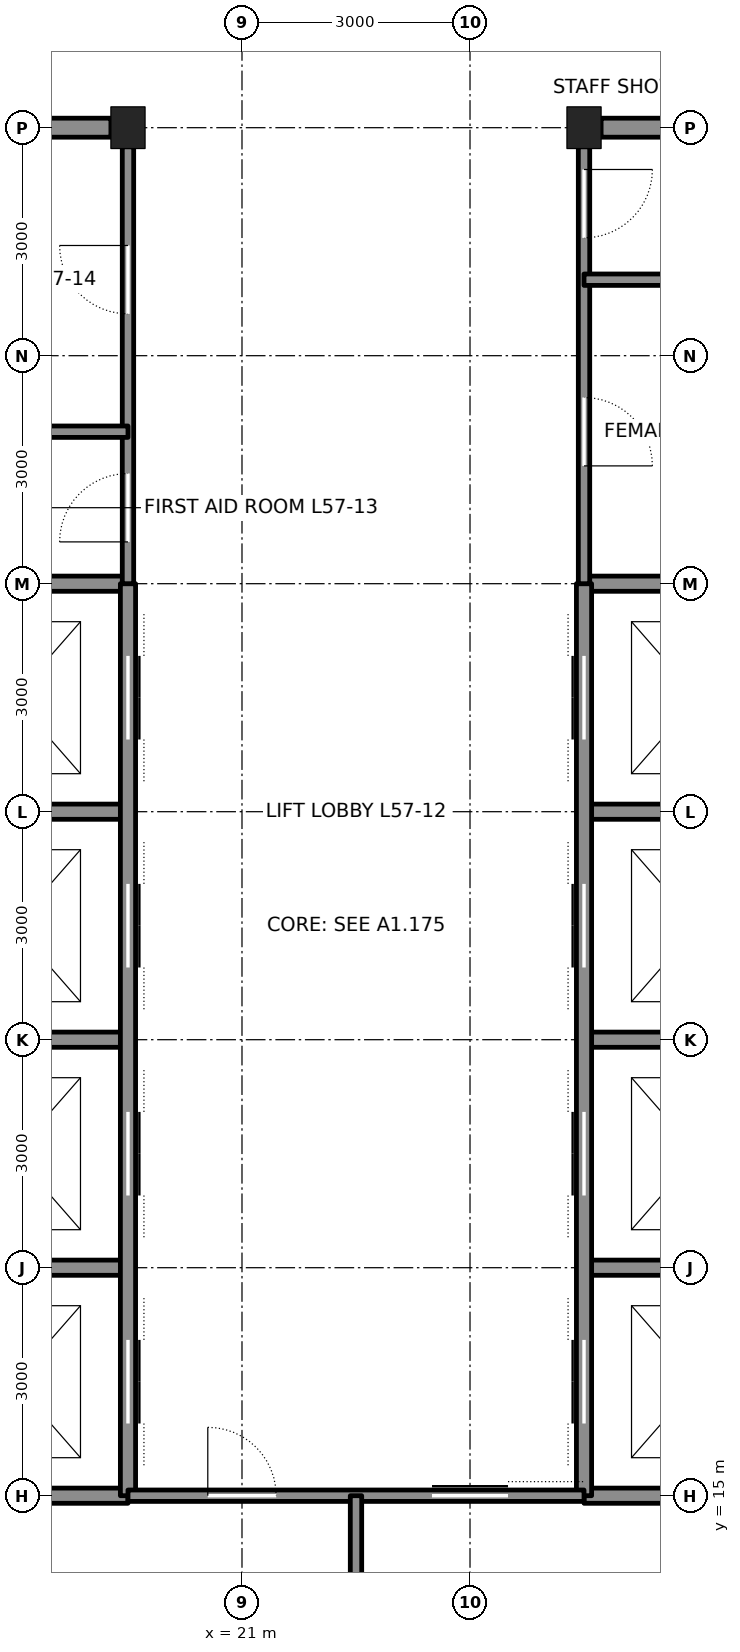
"""IFC4 building model, lengths in metres.
Left out: names, types, materials, properties, quantities, classifications, styles, units other than length and angle.
Written with IfcOpenShell. Run it as: python <this file> out.ifc"""

import sys

from ifc_helpers import new_model, si_unit, direction, frame, frame_2d, origin, origin_2d, place, context, subcontext, project, spatial, rectangle, i_section, extrude, element, fill, save


model = new_model("IFC4")
c1 = context("Model", 3, precision=1e-05, world=origin(), true_north=direction((0.0, 1.0)))
c2 = subcontext(c1, "Body", "Model", "MODEL_VIEW")
j1 = project(units=[si_unit("LENGTHUNIT", "METRE"), si_unit("PLANEANGLEUNIT", "RADIAN")], contexts=[c1])
p1 = place(None, origin())
s1 = spatial("IfcSite", under=j1, at=p1, CompositionType="ELEMENT")
p2 = place(p1, origin())
s2 = spatial("IfcBuilding", under=s1, at=p2, CompositionType="ELEMENT")
p3 = place(p2, frame((0.0, 0.0, 257.7)))
s3 = spatial("IfcBuildingStorey", under=s2, at=p3, CompositionType="ELEMENT", Elevation=257.7)
for number, where, z_axis, x_axis in (
    (1, (19.5, 33.0, 0.0), (0.0, 0.0, 1.0), (1.0, 0.0, 0.0)),
    (2, (25.5, 33.0, 0.0), (0.0, 0.0, 1.0), (1.0, 0.0, 0.0)),
):
    element("IfcColumn", number, at=place(p3, frame(where, z_axis=z_axis, x_axis=x_axis)), inside=s3, PredefinedType="COLUMN", context=c2, shape_type="SweptSolid", body=[
        extrude(i_section(OverallWidth=0.449, OverallDepth=0.549, WebThickness=0.072, FlangeThickness=0.115, at=origin_2d()), origin(), (0.0, 0.0, 1.0), 4.5),
    ])
for number, where, z_axis, x_axis in (
    (3, (12.0, 15.0, 0.0), (0.0, 0.0, 1.0), (1.0, 0.0, 0.0)),
    (4, (25.5, 15.0, 0.0), (0.0, 0.0, 1.0), (1.0, 0.0, 0.0)),
):
    element("IfcWall", number, at=place(p3, frame(where, z_axis=z_axis, x_axis=x_axis)), inside=s3, PredefinedType="SOLIDWALL", context=c2, shape_type="SweptSolid", body=[
        extrude(rectangle(XDim=7.5, YDim=0.2, at=frame_2d((3.75, 0.0))), origin(), (0.0, 0.0, 1.0), 4.34),
    ])
for number, where, z_axis, x_axis in (
    (5, (16.725, 24.0, 0.0), (0.0, 0.0, 1.0), (1.0, 0.0, 0.0)),
    (6, (25.5, 24.0, 0.0), (0.0, 0.0, 1.0), (1.0, 0.0, 0.0)),
):
    element("IfcWall", number, at=place(p3, frame(where, z_axis=z_axis, x_axis=x_axis)), inside=s3, PredefinedType="SOLIDWALL", context=c2, shape_type="SweptSolid", body=[
        extrude(rectangle(XDim=2.775, YDim=0.2, at=frame_2d((1.388, 0.0))), origin(), (0.0, 0.0, 1.0), 3.39),
    ])
p4 = place(p3, frame((12.0, 27.0, 0.0), z_axis=(0.0, 0.0, 1.0), x_axis=(1.0, 0.0, 0.0)))
e7 = element("IfcWall", 7, at=p4, inside=s3, PredefinedType="SOLIDWALL", context=c2, shape_type="SweptSolid", body=[
    extrude(rectangle(XDim=7.5, YDim=0.2, at=frame_2d((3.75, 0.0))), origin(), (0.0, 0.0, 1.0), 4.34),
])
p5 = place(p4, frame((1.65, 0.0, 0.0)))
e8 = element("IfcOpeningElement", 8, at=p5, cuts=e7, PredefinedType="OPENING", context=c2, shape_type="SweptSolid", body=[
    extrude(rectangle(XDim=1.2, YDim=2.1, at=frame_2d((0.6, 1.05))), frame((0.0, 0.11, 0.0), z_axis=(0.0, -1.0, 0.0), x_axis=(1.0, 0.0, 0.0)), (0.0, 0.0, 1.0), 0.22),
])
p6 = place(p3, frame((25.5, 27.0, 0.0), z_axis=(0.0, 0.0, 1.0), x_axis=(1.0, 0.0, 0.0)))
e9 = element("IfcWall", 9, at=p6, inside=s3, PredefinedType="SOLIDWALL", context=c2, shape_type="SweptSolid", body=[
    extrude(rectangle(XDim=3.0, YDim=0.2, at=frame_2d((1.5, 0.0))), origin(), (0.0, 0.0, 1.0), 4.34),
])
for number, where, z_axis, x_axis in (
    (10, (16.725, 33.0, 0.0), (0.0, 0.0, 1.0), (1.0, 0.0, 0.0)),
    (11, (25.725, 33.0, 0.0), (0.0, 0.0, 1.0), (1.0, 0.0, 0.0)),
):
    element("IfcWall", number, at=place(p3, frame(where, z_axis=z_axis, x_axis=x_axis)), inside=s3, PredefinedType="SOLIDWALL", context=c2, shape_type="SweptSolid", body=[
        extrude(rectangle(XDim=2.55, YDim=0.25, at=frame_2d((1.275, 0.0))), origin(), (0.0, 0.0, 1.0), 3.481),
    ])
p7 = place(p3, frame((16.5, 18.0, 0.0), z_axis=(0.0, 0.0, 1.0), x_axis=(1.0, 0.0, 0.0)))
e12 = element("IfcWall", 12, at=p7, inside=s3, PredefinedType="SOLIDWALL", context=c2, shape_type="SweptSolid", body=[
    extrude(rectangle(XDim=3.0, YDim=0.2, at=frame_2d((1.5, 0.0))), origin(), (0.0, 0.0, 1.0), 4.34),
])
p8 = place(p3, frame((25.5, 18.0, 0.0), z_axis=(0.0, 0.0, 1.0), x_axis=(1.0, 0.0, 0.0)))
e13 = element("IfcWall", 13, at=p8, inside=s3, PredefinedType="SOLIDWALL", context=c2, shape_type="SweptSolid", body=[
    extrude(rectangle(XDim=7.5, YDim=0.2, at=frame_2d((3.75, 0.0))), origin(), (0.0, 0.0, 1.0), 4.34),
])
p9 = place(p8, frame((4.65, 0.0, 0.0)))
e14 = element("IfcOpeningElement", 14, at=p9, cuts=e13, PredefinedType="OPENING", context=c2, shape_type="SweptSolid", body=[
    extrude(rectangle(XDim=1.2, YDim=2.1, at=frame_2d((0.6, 1.05))), frame((0.0, 0.11, 0.0), z_axis=(0.0, -1.0, 0.0), x_axis=(1.0, 0.0, 0.0)), (0.0, 0.0, 1.0), 0.22),
])
for number, where, z_axis, x_axis in (
    (15, (16.725, 21.0, 0.0), (0.0, 0.0, 1.0), (1.0, 0.0, 0.0)),
    (16, (25.5, 21.0, 0.0), (0.0, 0.0, 1.0), (1.0, 0.0, 0.0)),
):
    element("IfcWall", number, at=place(p3, frame(where, z_axis=z_axis, x_axis=x_axis)), inside=s3, PredefinedType="SOLIDWALL", context=c2, shape_type="SweptSolid", body=[
        extrude(rectangle(XDim=2.775, YDim=0.2, at=frame_2d((1.388, 0.0))), origin(), (0.0, 0.0, 1.0), 3.39),
    ])
p10 = place(p3, frame((19.5, 15.0, 0.0), z_axis=(0.0, 0.0, 1.0), x_axis=(0.0, 1.0, 0.0)))
e17 = element("IfcWall", 17, at=p10, inside=s3, PredefinedType="SOLIDWALL", context=c2, shape_type="SweptSolid", body=[
    extrude(rectangle(XDim=12.0, YDim=0.2, at=frame_2d((6.0, 0.0))), origin(), (0.0, 0.0, 1.0), 3.365),
])
p11 = place(p10, frame((0.95, 0.0, 0.0)))
e18 = element("IfcOpeningElement", 18, at=p11, cuts=e17, PredefinedType="OPENING", context=c2, shape_type="SweptSolid", body=[
    extrude(rectangle(XDim=1.1, YDim=2.1, at=frame_2d((0.55, 1.05))), frame((0.0, 0.11, 0.0), z_axis=(0.0, -1.0, 0.0), x_axis=(1.0, 0.0, 0.0)), (0.0, 0.0, 1.0), 0.22),
])
p12 = place(p10, frame((3.95, 0.0, 0.0)))
e19 = element("IfcOpeningElement", 19, at=p12, cuts=e17, PredefinedType="OPENING", context=c2, shape_type="SweptSolid", body=[
    extrude(rectangle(XDim=1.1, YDim=2.1, at=frame_2d((0.55, 1.05))), frame((0.0, 0.11, 0.0), z_axis=(0.0, -1.0, 0.0), x_axis=(1.0, 0.0, 0.0)), (0.0, 0.0, 1.0), 0.22),
])
p13 = place(p10, frame((6.95, 0.0, 0.0)))
e20 = element("IfcOpeningElement", 20, at=p13, cuts=e17, PredefinedType="OPENING", context=c2, shape_type="SweptSolid", body=[
    extrude(rectangle(XDim=1.1, YDim=2.1, at=frame_2d((0.55, 1.05))), frame((0.0, 0.11, 0.0), z_axis=(0.0, -1.0, 0.0), x_axis=(1.0, 0.0, 0.0)), (0.0, 0.0, 1.0), 0.22),
])
p14 = place(p10, frame((9.95, 0.0, 0.0)))
e21 = element("IfcOpeningElement", 21, at=p14, cuts=e17, PredefinedType="OPENING", context=c2, shape_type="SweptSolid", body=[
    extrude(rectangle(XDim=1.1, YDim=2.1, at=frame_2d((0.55, 1.05))), frame((0.0, 0.11, 0.0), z_axis=(0.0, -1.0, 0.0), x_axis=(1.0, 0.0, 0.0)), (0.0, 0.0, 1.0), 0.22),
])
p15 = place(p3, frame((19.5, 27.0, 0.0), z_axis=(0.0, 0.0, 1.0), x_axis=(0.0, 1.0, 0.0)))
e22 = element("IfcWall", 22, at=p15, inside=s3, PredefinedType="PARTITIONING", context=c2, shape_type="SweptSolid", body=[
    extrude(rectangle(XDim=5.75, YDim=0.15, at=frame_2d((2.875, 0.0))), origin(), (0.0, 0.0, 1.0), 3.365),
])
p16 = place(p15, frame((0.55, 0.0, 0.0)))
e23 = element("IfcOpeningElement", 23, at=p16, cuts=e22, PredefinedType="OPENING", context=c2, shape_type="SweptSolid", body=[
    extrude(rectangle(XDim=0.9, YDim=2.1, at=frame_2d((0.45, 1.05))), frame((0.0, 0.085, 0.0), z_axis=(0.0, -1.0, 0.0), x_axis=(1.0, 0.0, 0.0)), (0.0, 0.0, 1.0), 0.17),
])
p17 = place(p15, frame((3.55, 0.0, 0.0)))
e24 = element("IfcOpeningElement", 24, at=p17, cuts=e22, PredefinedType="OPENING", context=c2, shape_type="SweptSolid", body=[
    extrude(rectangle(XDim=0.9, YDim=2.1, at=frame_2d((0.45, 1.05))), frame((0.0, 0.085, 0.0), z_axis=(0.0, -1.0, 0.0), x_axis=(1.0, 0.0, 0.0)), (0.0, 0.0, 1.0), 0.17),
])
p18 = place(p3, frame((25.5, 15.0, 0.0), z_axis=(0.0, 0.0, 1.0), x_axis=(0.0, 1.0, 0.0)))
e25 = element("IfcWall", 25, at=p18, inside=s3, PredefinedType="SOLIDWALL", context=c2, shape_type="SweptSolid", body=[
    extrude(rectangle(XDim=12.0, YDim=0.2, at=frame_2d((6.0, 0.0))), origin(), (0.0, 0.0, 1.0), 3.365),
])
p19 = place(p18, frame((0.95, 0.0, 0.0)))
e26 = element("IfcOpeningElement", 26, at=p19, cuts=e25, PredefinedType="OPENING", context=c2, shape_type="SweptSolid", body=[
    extrude(rectangle(XDim=1.1, YDim=2.1, at=frame_2d((0.55, 1.05))), frame((0.0, 0.11, 0.0), z_axis=(0.0, -1.0, 0.0), x_axis=(1.0, 0.0, 0.0)), (0.0, 0.0, 1.0), 0.22),
])
p20 = place(p18, frame((3.95, 0.0, 0.0)))
e27 = element("IfcOpeningElement", 27, at=p20, cuts=e25, PredefinedType="OPENING", context=c2, shape_type="SweptSolid", body=[
    extrude(rectangle(XDim=1.1, YDim=2.1, at=frame_2d((0.55, 1.05))), frame((0.0, 0.11, 0.0), z_axis=(0.0, -1.0, 0.0), x_axis=(1.0, 0.0, 0.0)), (0.0, 0.0, 1.0), 0.22),
])
p21 = place(p18, frame((6.95, 0.0, 0.0)))
e28 = element("IfcOpeningElement", 28, at=p21, cuts=e25, PredefinedType="OPENING", context=c2, shape_type="SweptSolid", body=[
    extrude(rectangle(XDim=1.1, YDim=2.1, at=frame_2d((0.55, 1.05))), frame((0.0, 0.11, 0.0), z_axis=(0.0, -1.0, 0.0), x_axis=(1.0, 0.0, 0.0)), (0.0, 0.0, 1.0), 0.22),
])
p22 = place(p18, frame((9.95, 0.0, 0.0)))
e29 = element("IfcOpeningElement", 29, at=p22, cuts=e25, PredefinedType="OPENING", context=c2, shape_type="SweptSolid", body=[
    extrude(rectangle(XDim=1.1, YDim=2.1, at=frame_2d((0.55, 1.05))), frame((0.0, 0.11, 0.0), z_axis=(0.0, -1.0, 0.0), x_axis=(1.0, 0.0, 0.0)), (0.0, 0.0, 1.0), 0.22),
])
p23 = place(p3, frame((25.5, 27.0, 0.0), z_axis=(0.0, 0.0, 1.0), x_axis=(0.0, 1.0, 0.0)))
e30 = element("IfcWall", 30, at=p23, inside=s3, PredefinedType="PARTITIONING", context=c2, shape_type="SweptSolid", body=[
    extrude(rectangle(XDim=5.75, YDim=0.15, at=frame_2d((2.875, 0.0))), origin(), (0.0, 0.0, 1.0), 3.365),
])
p24 = place(p23, frame((1.55, 0.0, 0.0)))
e31 = element("IfcOpeningElement", 31, at=p24, cuts=e30, PredefinedType="OPENING", context=c2, shape_type="SweptSolid", body=[
    extrude(rectangle(XDim=0.9, YDim=2.1, at=frame_2d((0.45, 1.05))), frame((0.0, 0.085, 0.0), z_axis=(0.0, -1.0, 0.0), x_axis=(1.0, 0.0, 0.0)), (0.0, 0.0, 1.0), 0.17),
])
p25 = place(p23, frame((4.55, 0.0, 0.0)))
e32 = element("IfcOpeningElement", 32, at=p25, cuts=e30, PredefinedType="OPENING", context=c2, shape_type="SweptSolid", body=[
    extrude(rectangle(XDim=0.9, YDim=2.1, at=frame_2d((0.45, 1.05))), frame((0.0, 0.085, 0.0), z_axis=(0.0, -1.0, 0.0), x_axis=(1.0, 0.0, 0.0)), (0.0, 0.0, 1.0), 0.17),
])
p26 = place(p3, frame((19.5, 15.0, 0.0), z_axis=(0.0, 0.0, 1.0), x_axis=(1.0, 0.0, 0.0)))
e33 = element("IfcWall", 33, at=p26, inside=s3, PredefinedType="PARTITIONING", context=c2, shape_type="SweptSolid", body=[
    extrude(rectangle(XDim=6.0, YDim=0.15, at=frame_2d((3.0, 0.0))), origin(), (0.0, 0.0, 1.0), 4.34),
])
p27 = place(p26, frame((4.0, 0.0, 0.0)))
e34 = element("IfcOpeningElement", 34, at=p27, cuts=e33, PredefinedType="OPENING", context=c2, shape_type="SweptSolid", body=[
    extrude(rectangle(XDim=1.0, YDim=2.1, at=frame_2d((0.5, 1.05))), frame((0.0, 0.085, 0.0), z_axis=(0.0, -1.0, 0.0), x_axis=(1.0, 0.0, 0.0)), (0.0, 0.0, 1.0), 0.17),
])
p28 = place(p26, frame((1.05, 0.0, 0.0)))
e35 = element("IfcOpeningElement", 35, at=p28, cuts=e33, PredefinedType="OPENING", context=c2, shape_type="SweptSolid", body=[
    extrude(rectangle(XDim=0.9, YDim=2.1, at=frame_2d((0.45, 1.05))), frame((0.0, 0.085, 0.0), z_axis=(0.0, -1.0, 0.0), x_axis=(1.0, 0.0, 0.0)), (0.0, 0.0, 1.0), 0.17),
])
for number, where, z_axis, x_axis in (
    (36, (22.5, 15.0, 0.0), (0.0, 0.0, 1.0), (0.0, -1.0, 0.0)),
    (37, (16.5, 29.0, 0.0), (0.0, 0.0, 1.0), (1.0, 0.0, 0.0)),
    (38, (25.5, 31.0, 0.0), (0.0, 0.0, 1.0), (1.0, 0.0, 0.0)),
):
    element("IfcWall", number, at=place(p3, frame(where, z_axis=z_axis, x_axis=x_axis)), inside=s3, PredefinedType="PARTITIONING", context=c2, shape_type="SweptSolid", body=[
        extrude(rectangle(XDim=3.0, YDim=0.15, at=frame_2d((1.5, 0.0))), origin(), (0.0, 0.0, 1.0), 4.34),
    ])
p29 = place(p16, origin())
e39 = element("IfcDoor", 39, at=p29, inside=s3, OperationType="SINGLE_SWING_LEFT", PredefinedType="DOOR", context=c2, shape_type="SweptSolid", body=[
    extrude(rectangle(XDim=0.9, YDim=2.1, at=frame_2d((0.45, 1.05))), frame((0.0, 0.025, 0.0), z_axis=(0.0, -1.0, 0.0), x_axis=(1.0, 0.0, 0.0)), (0.0, 0.0, 1.0), 0.05),
])
fill(e23, e39)
p30 = place(p17, origin())
e40 = element("IfcDoor", 40, at=p30, inside=s3, OperationType="SINGLE_SWING_RIGHT", PredefinedType="DOOR", context=c2, shape_type="SweptSolid", body=[
    extrude(rectangle(XDim=0.9, YDim=2.1, at=frame_2d((0.45, 1.05))), frame((0.0, 0.025, 0.0), z_axis=(0.0, -1.0, 0.0), x_axis=(1.0, 0.0, 0.0)), (0.0, 0.0, 1.0), 0.05),
])
fill(e24, e40)
p31 = place(p24, frame((0.9, 0.0, 0.0), z_axis=(0.0, 0.0, 1.0), x_axis=(-1.0, 0.0, 0.0)))
e41 = element("IfcDoor", 41, at=p31, inside=s3, OperationType="SINGLE_SWING_RIGHT", PredefinedType="DOOR", context=c2, shape_type="SweptSolid", body=[
    extrude(rectangle(XDim=0.9, YDim=2.1, at=frame_2d((0.45, 1.05))), frame((0.0, 0.025, 0.0), z_axis=(0.0, -1.0, 0.0), x_axis=(1.0, 0.0, 0.0)), (0.0, 0.0, 1.0), 0.05),
])
fill(e31, e41)
p32 = place(p25, frame((0.9, 0.0, 0.0), z_axis=(0.0, 0.0, 1.0), x_axis=(-1.0, 0.0, 0.0)))
e42 = element("IfcDoor", 42, at=p32, inside=s3, OperationType="SINGLE_SWING_LEFT", PredefinedType="DOOR", context=c2, shape_type="SweptSolid", body=[
    extrude(rectangle(XDim=0.9, YDim=2.1, at=frame_2d((0.45, 1.05))), frame((0.0, 0.025, 0.0), z_axis=(0.0, -1.0, 0.0), x_axis=(1.0, 0.0, 0.0)), (0.0, 0.0, 1.0), 0.05),
])
fill(e32, e42)
p33 = place(p27, origin())
e43 = element("IfcDoor", 43, at=p33, inside=s3, OperationType="SLIDING_TO_LEFT", PredefinedType="DOOR", context=c2, shape_type="SweptSolid", body=[
    extrude(rectangle(XDim=1.0, YDim=2.1, at=frame_2d((0.5, 1.05))), frame((0.0, 0.025, 0.0), z_axis=(0.0, -1.0, 0.0), x_axis=(1.0, 0.0, 0.0)), (0.0, 0.0, 1.0), 0.05),
])
fill(e34, e43)
p34 = place(p28, origin())
e44 = element("IfcDoor", 44, at=p34, inside=s3, OperationType="SINGLE_SWING_LEFT", PredefinedType="DOOR", context=c2, shape_type="SweptSolid", body=[
    extrude(rectangle(XDim=0.9, YDim=2.1, at=frame_2d((0.45, 1.05))), frame((0.0, 0.025, 0.0), z_axis=(0.0, -1.0, 0.0), x_axis=(1.0, 0.0, 0.0)), (0.0, 0.0, 1.0), 0.05),
])
fill(e35, e44)
p35 = place(p11, origin())
e45 = element("IfcDoor", 45, at=p35, inside=s3, OperationType="DOUBLE_DOOR_SLIDING", PredefinedType="DOOR", context=c2, shape_type="SweptSolid", body=[
    extrude(rectangle(XDim=1.1, YDim=2.1, at=frame_2d((0.55, 1.05))), frame((0.0, 0.025, 0.0), z_axis=(0.0, -1.0, 0.0), x_axis=(1.0, 0.0, 0.0)), (0.0, 0.0, 1.0), 0.05),
])
fill(e18, e45)
p36 = place(p19, origin())
e46 = element("IfcDoor", 46, at=p36, inside=s3, OperationType="DOUBLE_DOOR_SLIDING", PredefinedType="DOOR", context=c2, shape_type="SweptSolid", body=[
    extrude(rectangle(XDim=1.1, YDim=2.1, at=frame_2d((0.55, 1.05))), frame((0.0, 0.025, 0.0), z_axis=(0.0, -1.0, 0.0), x_axis=(1.0, 0.0, 0.0)), (0.0, 0.0, 1.0), 0.05),
])
fill(e26, e46)
p37 = place(p12, origin())
e47 = element("IfcDoor", 47, at=p37, inside=s3, OperationType="DOUBLE_DOOR_SLIDING", PredefinedType="DOOR", context=c2, shape_type="SweptSolid", body=[
    extrude(rectangle(XDim=1.1, YDim=2.1, at=frame_2d((0.55, 1.05))), frame((0.0, 0.025, 0.0), z_axis=(0.0, -1.0, 0.0), x_axis=(1.0, 0.0, 0.0)), (0.0, 0.0, 1.0), 0.05),
])
fill(e19, e47)
p38 = place(p20, origin())
e48 = element("IfcDoor", 48, at=p38, inside=s3, OperationType="DOUBLE_DOOR_SLIDING", PredefinedType="DOOR", context=c2, shape_type="SweptSolid", body=[
    extrude(rectangle(XDim=1.1, YDim=2.1, at=frame_2d((0.55, 1.05))), frame((0.0, 0.025, 0.0), z_axis=(0.0, -1.0, 0.0), x_axis=(1.0, 0.0, 0.0)), (0.0, 0.0, 1.0), 0.05),
])
fill(e27, e48)
p39 = place(p13, origin())
e49 = element("IfcDoor", 49, at=p39, inside=s3, OperationType="DOUBLE_DOOR_SLIDING", PredefinedType="DOOR", context=c2, shape_type="SweptSolid", body=[
    extrude(rectangle(XDim=1.1, YDim=2.1, at=frame_2d((0.55, 1.05))), frame((0.0, 0.025, 0.0), z_axis=(0.0, -1.0, 0.0), x_axis=(1.0, 0.0, 0.0)), (0.0, 0.0, 1.0), 0.05),
])
fill(e20, e49)
p40 = place(p21, origin())
e50 = element("IfcDoor", 50, at=p40, inside=s3, OperationType="DOUBLE_DOOR_SLIDING", PredefinedType="DOOR", context=c2, shape_type="SweptSolid", body=[
    extrude(rectangle(XDim=1.1, YDim=2.1, at=frame_2d((0.55, 1.05))), frame((0.0, 0.025, 0.0), z_axis=(0.0, -1.0, 0.0), x_axis=(1.0, 0.0, 0.0)), (0.0, 0.0, 1.0), 0.05),
])
fill(e28, e50)
p41 = place(p14, origin())
e51 = element("IfcDoor", 51, at=p41, inside=s3, OperationType="DOUBLE_DOOR_SLIDING", PredefinedType="DOOR", context=c2, shape_type="SweptSolid", body=[
    extrude(rectangle(XDim=1.1, YDim=2.1, at=frame_2d((0.55, 1.05))), frame((0.0, 0.025, 0.0), z_axis=(0.0, -1.0, 0.0), x_axis=(1.0, 0.0, 0.0)), (0.0, 0.0, 1.0), 0.05),
])
fill(e21, e51)
p42 = place(p22, origin())
e52 = element("IfcDoor", 52, at=p42, inside=s3, OperationType="DOUBLE_DOOR_SLIDING", PredefinedType="DOOR", context=c2, shape_type="SweptSolid", body=[
    extrude(rectangle(XDim=1.1, YDim=2.1, at=frame_2d((0.55, 1.05))), frame((0.0, 0.025, 0.0), z_axis=(0.0, -1.0, 0.0), x_axis=(1.0, 0.0, 0.0)), (0.0, 0.0, 1.0), 0.05),
])
fill(e29, e52)
save(model, sys.argv[1])
